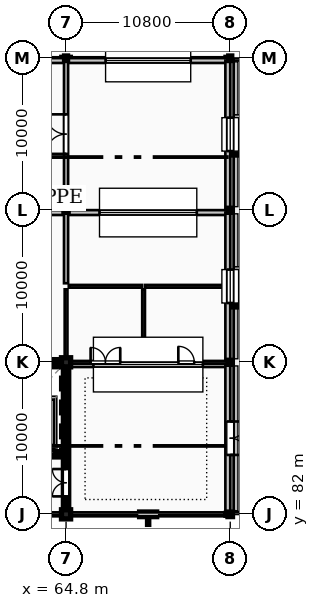
"""IFC4 building model, lengths in metres.
Left out: names, types, materials, properties, quantities, classifications, styles, units other than length and angle.
Written with IfcOpenShell. Run it as: python <this file> out.ifc"""

import sys

from ifc_helpers import new_model, si_unit, direction, frame, frame_2d, origin, origin_2d, place, context, subcontext, project, spatial, polyline, rectangle, hollow_rectangle, i_section, outline, extrude, element, fill, save


model = new_model("IFC4")
c1 = context("Model", 3, precision=1e-05, world=origin(), true_north=direction((0.0, 1.0)))
c2 = subcontext(c1, "Body", "Model", "MODEL_VIEW")
j1 = project(units=[si_unit("LENGTHUNIT", "METRE"), si_unit("PLANEANGLEUNIT", "RADIAN")], contexts=[c1])
p1 = place(None, origin())
s1 = spatial("IfcSite", under=j1, at=p1, CompositionType="ELEMENT")
p2 = place(p1, origin())
s2 = spatial("IfcBuilding", under=s1, at=p2, CompositionType="ELEMENT")
p3 = place(p2, frame((0.0, 0.0, 28.8)))
s3 = spatial("IfcBuildingStorey", under=s2, at=p3, CompositionType="ELEMENT", Elevation=28.8)
for number, where, z_axis, x_axis in (
    (1, (64.8, 82.0, 0.0), (0.0, 0.0, 1.0), (1.0, 0.0, 0.0)),
    (2, (64.8, 92.0, 0.0), (0.0, 0.0, 1.0), (1.0, 0.0, 0.0)),
):
    element("IfcColumn", number, at=place(p3, frame(where, z_axis=z_axis, x_axis=x_axis)), inside=s3, PredefinedType="COLUMN", context=c2, shape_type="SweptSolid", body=[
        extrude(rectangle(XDim=0.6, YDim=0.6, at=origin_2d()), origin(), (0.0, 0.0, 1.0), 5.4),
    ])
p4 = place(p3, frame((64.8, 102.0, 0.0), z_axis=(0.0, 0.0, 1.0), x_axis=(1.0, 0.0, 0.0)))
e3 = element("IfcColumn", 3, at=p4, inside=s3, PredefinedType="COLUMN", context=c2, shape_type="SweptSolid", body=[
    extrude(i_section(OverallWidth=0.28, OverallDepth=0.27, WebThickness=0.008, FlangeThickness=0.013, FilletRadius=0.024, at=origin_2d()), origin(), (0.0, 0.0, 1.0), 5.4),
])
p5 = place(p3, frame((64.8, 112.0, 0.0), z_axis=(0.0, 0.0, 1.0), x_axis=(1.0, 0.0, 0.0)))
e4 = element("IfcColumn", 4, at=p5, inside=s3, PredefinedType="COLUMN", context=c2, shape_type="SweptSolid", body=[
    extrude(hollow_rectangle(XDim=0.2, YDim=0.3, WallThickness=0.012, InnerFilletRadius=0.012, OuterFilletRadius=0.025, at=origin_2d()), origin(), (0.0, 0.0, 1.0), 5.4),
])
p6 = place(p3, frame((75.6, 82.0, 0.0), z_axis=(0.0, 0.0, 1.0), x_axis=(1.0, 0.0, 0.0)))
e5 = element("IfcColumn", 5, at=p6, inside=s3, PredefinedType="COLUMN", context=c2, shape_type="SweptSolid", body=[
    extrude(hollow_rectangle(XDim=0.3, YDim=0.3, WallThickness=0.016, InnerFilletRadius=0.016, OuterFilletRadius=0.032, at=origin_2d()), origin(), (0.0, 0.0, 1.0), 5.4),
])
for number, where, z_axis, x_axis in (
    (6, (75.6, 92.0, 0.0), (0.0, 0.0, 1.0), (1.0, 0.0, 0.0)),
    (7, (75.6, 102.0, 0.0), (0.0, 0.0, 1.0), (1.0, 0.0, 0.0)),
):
    element("IfcColumn", number, at=place(p3, frame(where, z_axis=z_axis, x_axis=x_axis)), inside=s3, PredefinedType="COLUMN", context=c2, shape_type="SweptSolid", body=[
        extrude(i_section(OverallWidth=0.28, OverallDepth=0.27, WebThickness=0.008, FlangeThickness=0.013, FilletRadius=0.024, at=origin_2d()), origin(), (0.0, 0.0, 1.0), 5.4),
    ])
p7 = place(p3, frame((75.6, 112.0, 0.0), z_axis=(0.0, 0.0, 1.0), x_axis=(1.0, 0.0, 0.0)))
e8 = element("IfcColumn", 8, at=p7, inside=s3, PredefinedType="COLUMN", context=c2, shape_type="SweptSolid", body=[
    extrude(hollow_rectangle(XDim=0.2, YDim=0.3, WallThickness=0.012, InnerFilletRadius=0.012, OuterFilletRadius=0.025, at=origin_2d()), origin(), (0.0, 0.0, 1.0), 5.4),
])
p8 = place(p3, frame((75.6, 82.145, 0.0), z_axis=(0.0, 0.0, 1.0), x_axis=(0.0, 1.0, 0.0)))
e9 = element("IfcWall", 9, at=p8, inside=s3, PredefinedType="STANDARD", context=c2, shape_type="SweptSolid", body=[
    extrude(rectangle(XDim=9.724, YDim=0.45, at=frame_2d((4.862, 0.0))), origin(), (0.0, 0.0, 1.0), 5.16),
])
p9 = place(p8, frame((3.762, 0.0, 0.0)))
e10 = element("IfcOpeningElement", 10, at=p9, cuts=e9, PredefinedType="OPENING", context=c2, shape_type="SweptSolid", body=[
    extrude(rectangle(XDim=2.2, YDim=2.4, at=frame_2d((1.1, 1.2))), frame((0.0, 0.235, 0.0), z_axis=(0.0, -1.0, 0.0), x_axis=(1.0, 0.0, 0.0)), (0.0, 0.0, 1.0), 0.47),
])
p10 = place(p3, frame((75.6, 92.131, 0.0), z_axis=(0.0, 0.0, 1.0), x_axis=(0.0, 1.0, 0.0)))
e11 = element("IfcWall", 11, at=p10, inside=s3, PredefinedType="STANDARD", context=c2, shape_type="SweptSolid", body=[
    extrude(rectangle(XDim=9.738, YDim=0.45, at=frame_2d((4.869, 0.0))), origin(), (0.0, 0.0, 1.0), 5.16),
])
p11 = place(p10, frame((3.769, 0.0, 1.0)))
e12 = element("IfcOpeningElement", 12, at=p11, cuts=e11, PredefinedType="OPENING", context=c2, shape_type="SweptSolid", body=[
    extrude(rectangle(XDim=2.2, YDim=3.0, at=frame_2d((1.1, 1.5))), frame((0.0, 0.235, 0.0), z_axis=(0.0, -1.0, 0.0), x_axis=(1.0, 0.0, 0.0)), (0.0, 0.0, 1.0), 0.47),
])
p12 = place(p3, frame((75.6, 102.131, 0.0), z_axis=(0.0, 0.0, 1.0), x_axis=(0.0, 1.0, 0.0)))
e13 = element("IfcWall", 13, at=p12, inside=s3, PredefinedType="STANDARD", context=c2, shape_type="SweptSolid", body=[
    extrude(rectangle(XDim=9.724, YDim=0.45, at=frame_2d((4.862, 0.0))), origin(), (0.0, 0.0, 1.0), 5.16),
])
p13 = place(p12, frame((3.762, 0.0, 1.0)))
e14 = element("IfcOpeningElement", 14, at=p13, cuts=e13, PredefinedType="OPENING", context=c2, shape_type="SweptSolid", body=[
    extrude(rectangle(XDim=2.2, YDim=3.0, at=frame_2d((1.1, 1.5))), frame((0.0, 0.235, 0.0), z_axis=(0.0, -1.0, 0.0), x_axis=(1.0, 0.0, 0.0)), (0.0, 0.0, 1.0), 0.47),
])
p14 = place(p3, frame((70.85, 112.0, 0.0), z_axis=(0.0, 0.0, 1.0), x_axis=(-1.0, 0.0, 0.0)))
e15 = element("IfcWall", 15, at=p14, inside=s3, PredefinedType="STANDARD", context=c2, shape_type="SweptSolid", body=[
    extrude(rectangle(XDim=1.3, YDim=0.48, at=frame_2d((0.65, 0.0))), origin(), (0.0, 0.0, 1.0), 5.044),
])
for number, where, z_axis, x_axis in (
    (16, (75.504, 112.0, 0.0), (0.0, 0.0, 1.0), (-1.0, 0.0, 0.0)),
    (17, (65.17, 112.0, 0.0), (0.0, 0.0, 1.0), (-1.0, 0.0, 0.0)),
):
    element("IfcWall", number, at=place(p3, frame(where, z_axis=z_axis, x_axis=x_axis)), inside=s3, PredefinedType="STANDARD", context=c2, shape_type="SweptSolid", body=[
        extrude(rectangle(XDim=0.274, YDim=0.3, at=frame_2d((0.137, 0.0))), origin(), (0.0, 0.0, 1.0), 5.16),
    ])
p15 = place(p3, frame((64.704, 112.0, 0.0), z_axis=(0.0, 0.0, 1.0), x_axis=(-1.0, 0.0, 0.0)))
e18 = element("IfcWall", 18, at=p15, inside=s3, PredefinedType="STANDARD", context=c2, shape_type="SweptSolid", body=[
    extrude(rectangle(XDim=0.274, YDim=0.3, at=frame_2d((0.137, 0.0))), origin(), (0.0, 0.0, 1.0), 5.16),
])
p16 = place(p3, frame((64.43, 82.0, 0.0), z_axis=(0.0, 0.0, 1.0), x_axis=(1.0, 0.0, 0.0)))
e19 = element("IfcWall", 19, at=p16, inside=s3, PredefinedType="STANDARD", context=c2, shape_type="SweptSolid", body=[
    extrude(rectangle(XDim=0.225, YDim=0.3, at=frame_2d((0.113, 0.0))), origin(), (0.0, 0.0, 1.0), 5.16),
])
p17 = place(p3, frame((69.55, 82.0, 0.0), z_axis=(0.0, 0.0, 1.0), x_axis=(1.0, 0.0, 0.0)))
e20 = element("IfcWall", 20, at=p17, inside=s3, PredefinedType="STANDARD", context=c2, shape_type="SweptSolid", body=[
    extrude(rectangle(XDim=1.3, YDim=0.48, at=frame_2d((0.65, 0.0))), origin(), (0.0, 0.0, 1.0), 5.044),
])
p18 = place(p3, frame((64.945, 82.0, 0.0), z_axis=(0.0, 0.0, 1.0), x_axis=(1.0, 0.0, 0.0)))
e21 = element("IfcWall", 21, at=p18, inside=s3, PredefinedType="STANDARD", context=c2, shape_type="SweptSolid", body=[
    extrude(rectangle(XDim=0.225, YDim=0.3, at=frame_2d((0.112, 0.0))), origin(), (0.0, 0.0, 1.0), 5.16),
])
p19 = place(p3, frame((75.23, 82.0, 0.0), z_axis=(0.0, 0.0, 1.0), x_axis=(1.0, 0.0, 0.0)))
e22 = element("IfcWall", 22, at=p19, inside=s3, PredefinedType="STANDARD", context=c2, shape_type="SweptSolid", body=[
    extrude(rectangle(XDim=0.225, YDim=0.3, at=frame_2d((0.113, 0.0))), origin(), (0.0, 0.0, 1.0), 5.16),
])
p20 = place(p3, frame((54.16, 91.85, 5.4), z_axis=(0.0, 0.0, 1.0), x_axis=(1.0, 0.0, 0.0)))
e23 = element("IfcWall", 23, at=p20, inside=s3, PredefinedType="STANDARD", context=c2, shape_type="SweptSolid", body=[
    extrude(rectangle(XDim=10.48, YDim=0.32, at=frame_2d((5.24, 0.0))), origin(), (0.0, 0.0, 1.0), 2.45),
])
p21 = place(p20, frame((1.64, 0.0, 0.45)))
e24 = element("IfcOpeningElement", 24, at=p21, cuts=e23, PredefinedType="OPENING", context=c2, shape_type="SweptSolid", body=[
    extrude(rectangle(XDim=7.2, YDim=1.5, at=frame_2d((3.6, 0.75))), frame((0.0, 0.17, 0.0), z_axis=(0.0, -1.0, 0.0), x_axis=(1.0, 0.0, 0.0)), (0.0, 0.0, 1.0), 0.34),
])
p22 = place(p3, frame((64.96, 91.85, 5.4), z_axis=(0.0, 0.0, 1.0), x_axis=(1.0, 0.0, 0.0)))
e25 = element("IfcWall", 25, at=p22, inside=s3, PredefinedType="STANDARD", context=c2, shape_type="SweptSolid", body=[
    extrude(rectangle(XDim=10.48, YDim=0.32, at=frame_2d((5.24, 0.0))), origin(), (0.0, 0.0, 1.0), 2.45),
])
p23 = place(p22, frame((1.64, 0.0, 0.45)))
e26 = element("IfcOpeningElement", 26, at=p23, cuts=e25, PredefinedType="OPENING", context=c2, shape_type="SweptSolid", body=[
    extrude(rectangle(XDim=7.2, YDim=1.5, at=frame_2d((3.6, 0.75))), frame((0.0, 0.17, 0.0), z_axis=(0.0, -1.0, 0.0), x_axis=(1.0, 0.0, 0.0)), (0.0, 0.0, 1.0), 0.34),
])
p24 = place(p3, frame((75.44, 82.05, 5.4), z_axis=(0.0, 0.0, 1.0), x_axis=(0.0, 1.0, 0.0)))
e27 = element("IfcWall", 27, at=p24, inside=s3, PredefinedType="STANDARD", context=c2, shape_type="SweptSolid", body=[
    extrude(outline(polyline([(0.0, 0.0), (9.8, 0.0), (9.8, 2.55), (0.0, 0.15), (0.0, 0.0)])), frame((0.0, 0.16, 0.0), z_axis=(0.0, -1.0, 0.0), x_axis=(1.0, 0.0, 0.0)), (0.0, 0.0, 1.0), 0.32),
])
p25 = place(p3, frame((54.16, 101.85, 5.4), z_axis=(0.0, 0.0, 1.0), x_axis=(1.0, 0.0, 0.0)))
e28 = element("IfcWall", 28, at=p25, inside=s3, PredefinedType="STANDARD", context=c2, shape_type="SweptSolid", body=[
    extrude(rectangle(XDim=10.48, YDim=0.32, at=frame_2d((5.24, 0.0))), origin(), (0.0, 0.0, 1.0), 2.45),
])
p26 = place(p25, frame((2.04, 0.0, 0.45)))
e29 = element("IfcOpeningElement", 29, at=p26, cuts=e28, PredefinedType="OPENING", context=c2, shape_type="SweptSolid", body=[
    extrude(rectangle(XDim=6.4, YDim=1.5, at=frame_2d((3.2, 0.75))), frame((0.0, 0.17, 0.0), z_axis=(0.0, -1.0, 0.0), x_axis=(1.0, 0.0, 0.0)), (0.0, 0.0, 1.0), 0.34),
])
p27 = place(p3, frame((64.96, 101.85, 5.4), z_axis=(0.0, 0.0, 1.0), x_axis=(1.0, 0.0, 0.0)))
e30 = element("IfcWall", 30, at=p27, inside=s3, PredefinedType="STANDARD", context=c2, shape_type="SweptSolid", body=[
    extrude(rectangle(XDim=10.48, YDim=0.32, at=frame_2d((5.24, 0.0))), origin(), (0.0, 0.0, 1.0), 2.45),
])
p28 = place(p27, frame((2.04, 0.0, 0.45)))
e31 = element("IfcOpeningElement", 31, at=p28, cuts=e30, PredefinedType="OPENING", context=c2, shape_type="SweptSolid", body=[
    extrude(rectangle(XDim=6.4, YDim=1.5, at=frame_2d((3.2, 0.75))), frame((0.0, 0.17, 0.0), z_axis=(0.0, -1.0, 0.0), x_axis=(1.0, 0.0, 0.0)), (0.0, 0.0, 1.0), 0.34),
])
p29 = place(p3, frame((75.44, 92.05, 5.4), z_axis=(0.0, 0.0, 1.0), x_axis=(0.0, 1.0, 0.0)))
e32 = element("IfcWall", 32, at=p29, inside=s3, PredefinedType="STANDARD", context=c2, shape_type="SweptSolid", body=[
    extrude(outline(polyline([(0.0, 0.0), (9.8, 0.0), (9.8, 2.55), (0.0, 0.15), (0.0, 0.0)])), frame((0.0, 0.16, 0.0), z_axis=(0.0, -1.0, 0.0), x_axis=(1.0, 0.0, 0.0)), (0.0, 0.0, 1.0), 0.32),
])
p30 = place(p3, frame((54.16, 111.85, 5.4), z_axis=(0.0, 0.0, 1.0), x_axis=(1.0, 0.0, 0.0)))
e33 = element("IfcWall", 33, at=p30, inside=s3, PredefinedType="STANDARD", context=c2, shape_type="SweptSolid", body=[
    extrude(rectangle(XDim=10.48, YDim=0.32, at=frame_2d((5.24, 0.0))), origin(), (0.0, 0.0, 1.0), 2.45),
])
p31 = place(p30, frame((2.44, 0.0, 0.45)))
e34 = element("IfcOpeningElement", 34, at=p31, cuts=e33, PredefinedType="OPENING", context=c2, shape_type="SweptSolid", body=[
    extrude(rectangle(XDim=5.6, YDim=1.4, at=frame_2d((2.8, 0.7))), frame((0.0, 0.17, 0.0), z_axis=(0.0, -1.0, 0.0), x_axis=(1.0, 0.0, 0.0)), (0.0, 0.0, 1.0), 0.34),
])
p32 = place(p3, frame((64.96, 111.85, 5.4), z_axis=(0.0, 0.0, 1.0), x_axis=(1.0, 0.0, 0.0)))
e35 = element("IfcWall", 35, at=p32, inside=s3, PredefinedType="STANDARD", context=c2, shape_type="SweptSolid", body=[
    extrude(rectangle(XDim=10.48, YDim=0.32, at=frame_2d((5.24, 0.0))), origin(), (0.0, 0.0, 1.0), 2.45),
])
p33 = place(p32, frame((2.44, 0.0, 0.45)))
e36 = element("IfcOpeningElement", 36, at=p33, cuts=e35, PredefinedType="OPENING", context=c2, shape_type="SweptSolid", body=[
    extrude(rectangle(XDim=5.6, YDim=1.4, at=frame_2d((2.8, 0.7))), frame((0.0, 0.17, 0.0), z_axis=(0.0, -1.0, 0.0), x_axis=(1.0, 0.0, 0.0)), (0.0, 0.0, 1.0), 0.34),
])
p34 = place(p3, frame((75.44, 102.05, 5.4), z_axis=(0.0, 0.0, 1.0), x_axis=(0.0, 1.0, 0.0)))
e37 = element("IfcWall", 37, at=p34, inside=s3, PredefinedType="STANDARD", context=c2, shape_type="SweptSolid", body=[
    extrude(outline(polyline([(0.0, 0.0), (9.8, 0.0), (9.8, 2.55), (0.0, 0.15), (0.0, 0.0)])), frame((0.0, 0.16, 0.0), z_axis=(0.0, -1.0, 0.0), x_axis=(1.0, 0.0, 0.0)), (0.0, 0.0, 1.0), 0.32),
])
p35 = place(p3, frame((0.35, 82.0, 5.22), z_axis=(0.0, 0.0, 1.0), x_axis=(1.0, 0.0, 0.0)))
e38 = element("IfcWall", 38, at=p35, inside=s3, PredefinedType="PARAPET", context=c2, shape_type="SweptSolid", body=[
    extrude(rectangle(XDim=74.9, YDim=0.26, at=frame_2d((37.45, 0.0))), origin(), (0.0, 0.0, 1.0), 0.55),
])
p36 = place(p3, frame((54.3, 92.0, 0.0), z_axis=(0.0, 0.0, 1.0), x_axis=(1.0, 0.0, 0.0)))
e39 = element("IfcWall", 39, at=p36, inside=s3, PredefinedType="SHEAR", context=c2, shape_type="SweptSolid", body=[
    extrude(rectangle(XDim=10.2, YDim=0.35, at=frame_2d((5.1, 0.0))), origin(), (0.0, 0.0, 1.0), 5.16),
])
p37 = place(p3, frame((64.8, 82.3, 0.0), z_axis=(0.0, 0.0, 1.0), x_axis=(0.0, 1.0, 0.0)))
e40 = element("IfcWall", 40, at=p37, inside=s3, PredefinedType="SHEAR", context=c2, shape_type="SweptSolid", body=[
    extrude(rectangle(XDim=9.4, YDim=0.35, at=frame_2d((4.7, 0.0))), origin(), (0.0, 0.0, 1.0), 5.16),
])
p38 = place(p37, frame((0.88, 0.0, 0.0)))
e41 = element("IfcOpeningElement", 41, at=p38, cuts=e40, PredefinedType="OPENING", context=c2, shape_type="SweptSolid", body=[
    extrude(rectangle(XDim=1.8, YDim=2.25, at=frame_2d((0.9, 1.125))), frame((0.0, 0.185, 0.0), z_axis=(0.0, -1.0, 0.0), x_axis=(1.0, 0.0, 0.0)), (0.0, 0.0, 1.0), 0.37),
])
p39 = place(p3, frame((59.13, 85.95, 0.0), z_axis=(0.0, 0.0, 1.0), x_axis=(1.0, 0.0, 0.0)))
e42 = element("IfcWall", 42, at=p39, inside=s3, PredefinedType="SHEAR", context=c2, shape_type="SweptSolid", body=[
    extrude(rectangle(XDim=5.49, YDim=0.35, at=frame_2d((2.745, 0.0))), origin(), (0.0, 0.0, 1.0), 5.16),
])
p40 = place(p39, frame((0.65, 0.0, 0.0)))
e43 = element("IfcOpeningElement", 43, at=p40, cuts=e42, PredefinedType="OPENING", context=c2, shape_type="SweptSolid", body=[
    extrude(rectangle(XDim=1.1, YDim=2.2, at=frame_2d((0.55, 1.1))), frame((0.0, 0.185, 0.0), z_axis=(0.0, -1.0, 0.0), x_axis=(1.0, 0.0, 0.0)), (0.0, 0.0, 1.0), 0.37),
])
p41 = place(p39, frame((2.85, 0.0, 0.0)))
e44 = element("IfcOpeningElement", 44, at=p41, cuts=e42, PredefinedType="OPENING", context=c2, shape_type="SweptSolid", body=[
    extrude(rectangle(XDim=2.0, YDim=2.5, at=frame_2d((1.0, 1.25))), frame((0.0, 0.185, 0.0), z_axis=(0.0, -1.0, 0.0), x_axis=(1.0, 0.0, 0.0)), (0.0, 0.0, 1.0), 0.37),
])
p42 = place(p3, frame((64.98, 92.0, 0.0), z_axis=(0.0, 0.0, 1.0), x_axis=(1.0, 0.0, 0.0)))
e45 = element("IfcWall", 45, at=p42, inside=s3, PredefinedType="PLUMBINGWALL", context=c2, shape_type="SweptSolid", body=[
    extrude(rectangle(XDim=4.82, YDim=0.18, at=frame_2d((2.41, 0.0))), origin(), (0.0, 0.0, 1.0), 5.044),
])
p43 = place(p42, frame((1.435, 0.0, 0.0)))
e46 = element("IfcOpeningElement", 46, at=p43, cuts=e45, PredefinedType="OPENING", context=c2, shape_type="SweptSolid", body=[
    extrude(rectangle(XDim=1.95, YDim=2.5, at=frame_2d((0.975, 1.25))), frame((0.0, 0.1, 0.0), z_axis=(0.0, -1.0, 0.0), x_axis=(1.0, 0.0, 0.0)), (0.0, 0.0, 1.0), 0.2),
])
p44 = place(p3, frame((70.0, 92.0, 0.0), z_axis=(0.0, 0.0, 1.0), x_axis=(1.0, 0.0, 0.0)))
e47 = element("IfcWall", 47, at=p44, inside=s3, PredefinedType="PLUMBINGWALL", context=c2, shape_type="SweptSolid", body=[
    extrude(rectangle(XDim=5.42, YDim=0.18, at=frame_2d((2.71, 0.0))), origin(), (0.0, 0.0, 1.0), 5.044),
])
p45 = place(p44, frame((2.185, 0.0, 0.0)))
e48 = element("IfcOpeningElement", 48, at=p45, cuts=e47, PredefinedType="OPENING", context=c2, shape_type="SweptSolid", body=[
    extrude(rectangle(XDim=1.05, YDim=2.15, at=frame_2d((0.525, 1.075))), frame((0.0, 0.1, 0.0), z_axis=(0.0, -1.0, 0.0), x_axis=(1.0, 0.0, 0.0)), (0.0, 0.0, 1.0), 0.2),
])
p46 = place(p3, frame((64.8, 97.2, 0.0), z_axis=(0.0, 0.0, 1.0), x_axis=(0.0, 1.0, 0.0)))
e49 = element("IfcWall", 49, at=p46, inside=s3, PredefinedType="PARTITIONING", context=c2, shape_type="SweptSolid", body=[
    extrude(rectangle(XDim=4.6, YDim=0.27, at=frame_2d((2.3, 0.0))), origin(), (0.0, 0.0, 1.0), 5.12),
])
p47 = place(p3, frame((64.8, 102.2, 0.0), z_axis=(0.0, 0.0, 1.0), x_axis=(0.0, 1.0, 0.0)))
e50 = element("IfcWall", 50, at=p47, inside=s3, PredefinedType="PARTITIONING", context=c2, shape_type="SweptSolid", body=[
    extrude(rectangle(XDim=9.62, YDim=0.27, at=frame_2d((4.81, 0.0))), origin(), (0.0, 0.0, 1.0), 5.12),
])
p48 = place(p47, frame((3.51, 0.0, 0.0)))
e51 = element("IfcOpeningElement", 51, at=p48, cuts=e50, PredefinedType="OPENING", context=c2, shape_type="SweptSolid", body=[
    extrude(rectangle(XDim=2.6, YDim=2.8, at=frame_2d((1.3, 1.4))), frame((0.0, 0.145, 0.0), z_axis=(0.0, -1.0, 0.0), x_axis=(1.0, 0.0, 0.0)), (0.0, 0.0, 1.0), 0.29),
])
p49 = place(p3, frame((64.98, 97.0, 0.0), z_axis=(0.0, 0.0, 1.0), x_axis=(1.0, 0.0, 0.0)))
e52 = element("IfcWall", 52, at=p49, inside=s3, PredefinedType="PLUMBINGWALL", context=c2, shape_type="SweptSolid", body=[
    extrude(rectangle(XDim=4.82, YDim=0.18, at=frame_2d((2.41, 0.0))), origin(), (0.0, 0.0, 1.0), 5.12),
])
p50 = place(p3, frame((70.0, 97.0, 0.0), z_axis=(0.0, 0.0, 1.0), x_axis=(1.0, 0.0, 0.0)))
e53 = element("IfcWall", 53, at=p50, inside=s3, PredefinedType="PLUMBINGWALL", context=c2, shape_type="SweptSolid", body=[
    extrude(rectangle(XDim=5.42, YDim=0.18, at=frame_2d((2.71, 0.0))), origin(), (0.0, 0.0, 1.0), 5.12),
])
for number, where, z_axis, x_axis in (
    (54, (64.8, 92.18, 0.0), (0.0, 0.0, 1.0), (0.0, 1.0, 0.0)),
    (55, (69.9, 92.18, 0.0), (0.0, 0.0, 1.0), (0.0, 1.0, 0.0)),
):
    element("IfcWall", number, at=place(p3, frame(where, z_axis=z_axis, x_axis=x_axis)), inside=s3, PredefinedType="PLUMBINGWALL", context=c2, shape_type="SweptSolid", body=[
        extrude(rectangle(XDim=4.62, YDim=0.18, at=frame_2d((2.31, 0.0))), origin(), (0.0, 0.0, 1.0), 5.12),
    ])
p51 = place(p9, frame((2.2, 0.0, 0.0), z_axis=(0.0, 0.0, 1.0), x_axis=(-1.0, 0.0, 0.0)))
e56 = element("IfcDoor", 56, at=p51, inside=s3, OperationType="DOUBLE_DOOR_SINGLE_SWING", PredefinedType="DOOR", context=c2, shape_type="SweptSolid", body=[
    extrude(rectangle(XDim=2.2, YDim=2.4, at=frame_2d((1.1, 1.2))), frame((0.0, 0.025, 0.0), z_axis=(0.0, -1.0, 0.0), x_axis=(1.0, 0.0, 0.0)), (0.0, 0.0, 1.0), 0.05),
])
fill(e10, e56)
p52 = place(p11, origin())
e57 = element("IfcWindow", 57, at=p52, inside=s3, PartitioningType="SINGLE_PANEL", PredefinedType="WINDOW", context=c2, shape_type="SweptSolid", body=[
    extrude(rectangle(XDim=2.2, YDim=3.0, at=frame_2d((1.1, 1.5))), frame((0.0, 0.03, 0.0), z_axis=(0.0, -1.0, 0.0), x_axis=(1.0, 0.0, 0.0)), (0.0, 0.0, 1.0), 0.06),
])
fill(e12, e57)
p53 = place(p13, origin())
e58 = element("IfcWindow", 58, at=p53, inside=s3, PartitioningType="SINGLE_PANEL", PredefinedType="WINDOW", context=c2, shape_type="SweptSolid", body=[
    extrude(rectangle(XDim=2.2, YDim=3.0, at=frame_2d((1.1, 1.5))), frame((0.0, 0.03, 0.0), z_axis=(0.0, -1.0, 0.0), x_axis=(1.0, 0.0, 0.0)), (0.0, 0.0, 1.0), 0.06),
])
fill(e14, e58)
p54 = place(p23, origin())
e59 = element("IfcWindow", 59, at=p54, inside=s3, PartitioningType="SINGLE_PANEL", PredefinedType="SKYLIGHT", context=c2, shape_type="SweptSolid", body=[
    extrude(rectangle(XDim=7.2, YDim=1.5, at=frame_2d((3.6, 0.75))), frame((0.0, 0.03, 0.0), z_axis=(0.0, -1.0, 0.0), x_axis=(1.0, 0.0, 0.0)), (0.0, 0.0, 1.0), 0.06),
])
fill(e26, e59)
p55 = place(p28, origin())
e60 = element("IfcWindow", 60, at=p55, inside=s3, PartitioningType="SINGLE_PANEL", PredefinedType="SKYLIGHT", context=c2, shape_type="SweptSolid", body=[
    extrude(rectangle(XDim=6.4, YDim=1.5, at=frame_2d((3.2, 0.75))), frame((0.0, 0.03, 0.0), z_axis=(0.0, -1.0, 0.0), x_axis=(1.0, 0.0, 0.0)), (0.0, 0.0, 1.0), 0.06),
])
fill(e31, e60)
p56 = place(p33, origin())
e61 = element("IfcWindow", 61, at=p56, inside=s3, PartitioningType="SINGLE_PANEL", PredefinedType="SKYLIGHT", context=c2, shape_type="SweptSolid", body=[
    extrude(rectangle(XDim=5.6, YDim=1.4, at=frame_2d((2.8, 0.7))), frame((0.0, 0.03, 0.0), z_axis=(0.0, -1.0, 0.0), x_axis=(1.0, 0.0, 0.0)), (0.0, 0.0, 1.0), 0.06),
])
fill(e36, e61)
p57 = place(p38, origin())
e62 = element("IfcDoor", 62, at=p57, inside=s3, OperationType="DOUBLE_DOOR_SINGLE_SWING", PredefinedType="DOOR", context=c2, shape_type="SweptSolid", body=[
    extrude(rectangle(XDim=1.8, YDim=2.25, at=frame_2d((0.9, 1.125))), frame((0.0, 0.025, 0.0), z_axis=(0.0, -1.0, 0.0), x_axis=(1.0, 0.0, 0.0)), (0.0, 0.0, 1.0), 0.05),
])
fill(e41, e62)
p58 = place(p41, origin())
e63 = element("IfcDoor", 63, at=p58, inside=s3, OperationType="DOUBLE_DOOR_SLIDING", PredefinedType="DOOR", context=c2, shape_type="SweptSolid", body=[
    extrude(rectangle(XDim=2.0, YDim=2.5, at=frame_2d((1.0, 1.25))), frame((0.0, 0.025, 0.0), z_axis=(0.0, -1.0, 0.0), x_axis=(1.0, 0.0, 0.0)), (0.0, 0.0, 1.0), 0.05),
])
fill(e44, e63)
p59 = place(p43, origin())
e64 = element("IfcDoor", 64, at=p59, inside=s3, OperationType="DOUBLE_DOOR_SINGLE_SWING", PredefinedType="DOOR", context=c2, shape_type="SweptSolid", body=[
    extrude(rectangle(XDim=1.95, YDim=2.5, at=frame_2d((0.975, 1.25))), frame((0.0, 0.025, 0.0), z_axis=(0.0, -1.0, 0.0), x_axis=(1.0, 0.0, 0.0)), (0.0, 0.0, 1.0), 0.05),
])
fill(e46, e64)
p60 = place(p45, origin())
e65 = element("IfcDoor", 65, at=p60, inside=s3, OperationType="SINGLE_SWING_LEFT", PredefinedType="DOOR", context=c2, shape_type="SweptSolid", body=[
    extrude(rectangle(XDim=1.05, YDim=2.15, at=frame_2d((0.525, 1.075))), frame((0.0, 0.025, 0.0), z_axis=(0.0, -1.0, 0.0), x_axis=(1.0, 0.0, 0.0)), (0.0, 0.0, 1.0), 0.05),
])
fill(e48, e65)
p61 = place(p48, origin())
e66 = element("IfcDoor", 66, at=p61, inside=s3, OperationType="DOUBLE_DOOR_SINGLE_SWING", PredefinedType="DOOR", context=c2, shape_type="SweptSolid", body=[
    extrude(rectangle(XDim=2.6, YDim=2.8, at=frame_2d((1.3, 1.4))), frame((0.0, 0.025, 0.0), z_axis=(0.0, -1.0, 0.0), x_axis=(1.0, 0.0, 0.0)), (0.0, 0.0, 1.0), 0.05),
])
fill(e51, e66)
save(model, sys.argv[1])
